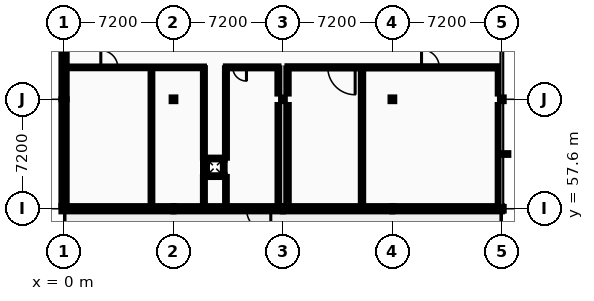
"""IFC4 building model, lengths in metres.
Left out: names, types, materials, properties, quantities, classifications, styles, units other than length and angle.
Written with IfcOpenShell. Run it as: python <this file> out.ifc"""

import sys

from ifc_helpers import new_model, si_unit, direction, frame, frame_2d, origin, origin_2d, place, context, subcontext, project, spatial, rectangle, i_section, extrude, element, fill, save


model = new_model("IFC4")
c1 = context("Model", 3, precision=1e-05, world=origin(), true_north=direction((0.0, 1.0)))
c2 = subcontext(c1, "Body", "Model", "MODEL_VIEW")
j1 = project(units=[si_unit("LENGTHUNIT", "METRE"), si_unit("PLANEANGLEUNIT", "RADIAN")], contexts=[c1])
p1 = place(None, origin())
s1 = spatial("IfcSite", under=j1, at=p1, CompositionType="ELEMENT")
p2 = place(p1, origin())
s2 = spatial("IfcBuilding", under=s1, at=p2, CompositionType="ELEMENT")
p3 = place(p2, frame((0.0, 0.0, 14.0)))
s3 = spatial("IfcBuildingStorey", under=s2, at=p3, CompositionType="ELEMENT", Elevation=14.0)
for number, where, z_axis, x_axis in (
    (1, (0.0, 57.6, 0.0), (0.0, 0.0, 1.0), (1.0, 0.0, 0.0)),
    (2, (0.0, 64.8, 0.0), (0.0, 0.0, 1.0), (1.0, 0.0, 0.0)),
    (3, (7.2, 57.6, 0.0), (0.0, 0.0, 1.0), (1.0, 0.0, 0.0)),
    (4, (7.2, 64.8, 0.0), (0.0, 0.0, 1.0), (1.0, 0.0, 0.0)),
    (5, (14.4, 57.6, 0.0), (0.0, 0.0, 1.0), (1.0, 0.0, 0.0)),
    (6, (14.4, 64.8, 0.0), (0.0, 0.0, 1.0), (1.0, 0.0, 0.0)),
    (7, (21.6, 57.6, 0.0), (0.0, 0.0, 1.0), (1.0, 0.0, 0.0)),
    (8, (21.6, 64.8, 0.0), (0.0, 0.0, 1.0), (1.0, 0.0, 0.0)),
    (9, (28.8, 57.6, 0.0), (0.0, 0.0, 1.0), (1.0, 0.0, 0.0)),
    (10, (28.8, 64.8, 0.0), (0.0, 0.0, 1.0), (1.0, 0.0, 0.0)),
):
    element("IfcColumn", number, at=place(p3, frame(where, z_axis=z_axis, x_axis=x_axis)), inside=s3, PredefinedType="COLUMN", context=c2, shape_type="SweptSolid", body=[
        extrude(i_section(OverallWidth=0.24, OverallDepth=0.24, WebThickness=0.01, FlangeThickness=0.017, FilletRadius=0.021, at=origin_2d()), origin(), (0.0, 0.0, 1.0), 4.4),
    ])
p4 = place(p3, frame((-0.17, 57.6, 0.0), z_axis=(0.0, 0.0, 1.0), x_axis=(1.0, 0.0, 0.0)))
e11 = element("IfcWall", 11, at=p4, inside=s3, PredefinedType="STANDARD", context=c2, shape_type="SweptSolid", body=[
    extrude(rectangle(XDim=7.37, YDim=0.34, at=frame_2d((3.685, 0.0))), origin(), (0.0, 0.0, 1.0), 4.035),
])
p5 = place(p3, frame((7.2, 57.6, 0.0), z_axis=(0.0, 0.0, 1.0), x_axis=(1.0, 0.0, 0.0)))
e12 = element("IfcWall", 12, at=p5, inside=s3, PredefinedType="STANDARD", context=c2, shape_type="SweptSolid", body=[
    extrude(rectangle(XDim=7.2, YDim=0.34, at=frame_2d((3.6, 0.0))), origin(), (0.0, 0.0, 1.0), 4.035),
])
p6 = place(p5, frame((4.8, 0.0, 0.0)))
e13 = element("IfcOpeningElement", 13, at=p6, cuts=e12, PredefinedType="OPENING", context=c2, shape_type="SweptSolid", body=[
    extrude(rectangle(XDim=1.6, YDim=2.2, at=frame_2d((0.8, 1.1))), frame((0.0, 0.18, 0.0), z_axis=(0.0, -1.0, 0.0), x_axis=(1.0, 0.0, 0.0)), (0.0, 0.0, 1.0), 0.36),
])
p7 = place(p3, frame((14.4, 57.6, 0.0), z_axis=(0.0, 0.0, 1.0), x_axis=(1.0, 0.0, 0.0)))
e14 = element("IfcWall", 14, at=p7, inside=s3, PredefinedType="STANDARD", context=c2, shape_type="SweptSolid", body=[
    extrude(rectangle(XDim=7.2, YDim=0.34, at=frame_2d((3.6, 0.0))), origin(), (0.0, 0.0, 1.0), 4.035),
])
p8 = place(p3, frame((21.6, 57.6, 0.0), z_axis=(0.0, 0.0, 1.0), x_axis=(1.0, 0.0, 0.0)))
e15 = element("IfcWall", 15, at=p8, inside=s3, PredefinedType="STANDARD", context=c2, shape_type="SweptSolid", body=[
    extrude(rectangle(XDim=7.2, YDim=0.34, at=frame_2d((3.6, 0.0))), origin(), (0.0, 0.0, 1.0), 4.035),
])
p9 = place(p3, frame((0.0, 64.8, 0.0), z_axis=(0.0, 0.0, 1.0), x_axis=(0.0, -1.0, 0.0)))
e16 = element("IfcWall", 16, at=p9, inside=s3, PredefinedType="STANDARD", context=c2, shape_type="SweptSolid", body=[
    extrude(rectangle(XDim=7.03, YDim=0.34, at=frame_2d((3.515, 0.0))), origin(), (0.0, 0.0, 1.0), 4.11),
])
p10 = place(p9, frame((1.628, 0.0, 0.95)))
e17 = element("IfcOpeningElement", 17, at=p10, cuts=e16, PredefinedType="OPENING", context=c2, shape_type="SweptSolid", body=[
    extrude(rectangle(XDim=0.962, YDim=1.332, at=frame_2d((0.481, 0.666))), frame((0.0, 0.18, 0.0), z_axis=(0.0, -1.0, 0.0), x_axis=(1.0, 0.0, 0.0)), (0.0, 0.0, 1.0), 0.36),
])
p11 = place(p9, frame((4.44, 0.0, 0.95)))
e18 = element("IfcOpeningElement", 18, at=p11, cuts=e16, PredefinedType="OPENING", context=c2, shape_type="SweptSolid", body=[
    extrude(rectangle(XDim=0.962, YDim=1.332, at=frame_2d((0.481, 0.666))), frame((0.0, 0.18, 0.0), z_axis=(0.0, -1.0, 0.0), x_axis=(1.0, 0.0, 0.0)), (0.0, 0.0, 1.0), 0.36),
])
p12 = place(p3, frame((0.0, 72.0, 0.0), z_axis=(0.0, 0.0, 1.0), x_axis=(0.0, -1.0, 0.0)))
e19 = element("IfcWall", 19, at=p12, inside=s3, PredefinedType="STANDARD", context=c2, shape_type="SweptSolid", body=[
    extrude(rectangle(XDim=7.2, YDim=0.34, at=frame_2d((3.6, 0.0))), origin(), (0.0, 0.0, 1.0), 4.11),
])
p13 = place(p3, frame((0.0, 57.8, 4.4), z_axis=(0.0, 0.0, 1.0), x_axis=(0.0, 1.0, 0.0)))
e20 = element("IfcWall", 20, at=p13, inside=s3, PredefinedType="PARAPET", context=c2, shape_type="SweptSolid", body=[
    extrude(rectangle(XDim=24.0, YDim=0.2, at=frame_2d((12.0, 0.0))), origin(), (0.0, 0.0, 1.0), 0.55),
])
for number, where, z_axis, x_axis in (
    (21, (9.29, 59.745, 0.0), (0.0, 0.0, 1.0), (1.0, 0.0, 0.0)),
    (22, (9.29, 60.905, 0.0), (0.0, 0.0, 1.0), (1.0, 0.0, 0.0)),
):
    element("IfcWall", number, at=place(p3, frame(where, z_axis=z_axis, x_axis=x_axis)), inside=s3, PredefinedType="PARTITIONING", context=c2, shape_type="SweptSolid", body=[
        extrude(rectangle(XDim=1.27, YDim=0.11, at=frame_2d((0.635, 0.0))), origin(), (0.0, 0.0, 1.0), 4.18),
    ])
for number, where, z_axis, x_axis in (
    (23, (9.345, 59.8, 0.0), (0.0, 0.0, 1.0), (0.0, 1.0, 0.0)),
    (24, (10.505, 59.8, 0.0), (0.0, 0.0, 1.0), (0.0, 1.0, 0.0)),
):
    element("IfcWall", number, at=place(p3, frame(where, z_axis=z_axis, x_axis=x_axis)), inside=s3, PredefinedType="PARTITIONING", context=c2, shape_type="SweptSolid", body=[
        extrude(rectangle(XDim=1.05, YDim=0.11, at=frame_2d((0.525, 0.0))), origin(), (0.0, 0.0, 1.0), 4.18),
    ])
p14 = place(p3, frame((0.2, 66.9, 0.0), z_axis=(0.0, 0.0, 1.0), x_axis=(1.0, 0.0, 0.0)))
e25 = element("IfcWall", 25, at=p14, inside=s3, PredefinedType="PARTITIONING", context=c2, shape_type="SweptSolid", body=[
    extrude(rectangle(XDim=9.0, YDim=0.11, at=frame_2d((4.5, 0.0))), origin(), (0.0, 0.0, 1.0), 4.18),
])
p15 = place(p14, frame((7.55, 0.0, 0.0)))
e26 = element("IfcOpeningElement", 26, at=p15, cuts=e25, PredefinedType="OPENING", context=c2, shape_type="SweptSolid", body=[
    extrude(rectangle(XDim=1.0, YDim=2.1, at=frame_2d((0.5, 1.05))), frame((0.0, 0.065, 0.0), z_axis=(0.0, -1.0, 0.0), x_axis=(1.0, 0.0, 0.0)), (0.0, 0.0, 1.0), 0.13),
])
p16 = place(p14, frame((2.218, 0.0, 0.0)))
e27 = element("IfcOpeningElement", 27, at=p16, cuts=e25, PredefinedType="OPENING", context=c2, shape_type="SweptSolid", body=[
    extrude(rectangle(XDim=1.114, YDim=2.04, at=frame_2d((0.557, 1.02))), frame((0.0, 0.065, 0.0), z_axis=(0.0, -1.0, 0.0), x_axis=(1.0, 0.0, 0.0)), (0.0, 0.0, 1.0), 0.13),
])
p17 = place(p3, frame((10.65, 66.9, 0.0), z_axis=(0.0, 0.0, 1.0), x_axis=(1.0, 0.0, 0.0)))
e28 = element("IfcWall", 28, at=p17, inside=s3, PredefinedType="PARTITIONING", context=c2, shape_type="SweptSolid", body=[
    extrude(rectangle(XDim=3.45, YDim=0.125, at=frame_2d((1.725, 0.0))), origin(), (0.0, 0.0, 1.0), 4.18),
])
p18 = place(p17, frame((0.45, 0.0, 0.0)))
e29 = element("IfcOpeningElement", 29, at=p18, cuts=e28, PredefinedType="OPENING", context=c2, shape_type="SweptSolid", body=[
    extrude(rectangle(XDim=0.9, YDim=2.1, at=frame_2d((0.45, 1.05))), frame((0.0, 0.073, 0.0), z_axis=(0.0, -1.0, 0.0), x_axis=(1.0, 0.0, 0.0)), (0.0, 0.0, 1.0), 0.145),
])
p19 = place(p3, frame((14.7, 66.9, 0.0), z_axis=(0.0, 0.0, 1.0), x_axis=(1.0, 0.0, 0.0)))
e30 = element("IfcWall", 30, at=p19, inside=s3, PredefinedType="PARTITIONING", context=c2, shape_type="SweptSolid", body=[
    extrude(rectangle(XDim=13.9, YDim=0.142, at=frame_2d((6.95, 0.0))), origin(), (0.0, 0.0, 1.0), 4.18),
])
p20 = place(p19, frame((2.65, 0.0, 0.0)))
e31 = element("IfcOpeningElement", 31, at=p20, cuts=e30, PredefinedType="OPENING", context=c2, shape_type="SweptSolid", body=[
    extrude(rectangle(XDim=1.8, YDim=2.3, at=frame_2d((0.9, 1.15))), frame((0.0, 0.081, 0.0), z_axis=(0.0, -1.0, 0.0), x_axis=(1.0, 0.0, 0.0)), (0.0, 0.0, 1.0), 0.162),
])
p21 = place(p19, frame((8.817, 0.0, 0.0)))
e32 = element("IfcOpeningElement", 32, at=p21, cuts=e30, PredefinedType="OPENING", context=c2, shape_type="SweptSolid", body=[
    extrude(rectangle(XDim=1.166, YDim=2.04, at=frame_2d((0.583, 1.02))), frame((0.0, 0.081, 0.0), z_axis=(0.0, -1.0, 0.0), x_axis=(1.0, 0.0, 0.0)), (0.0, 0.0, 1.0), 0.162),
])
p22 = place(p3, frame((5.75, 57.8, 0.0), z_axis=(0.0, 0.0, 1.0), x_axis=(0.0, 1.0, 0.0)))
e33 = element("IfcWall", 33, at=p22, inside=s3, PredefinedType="PARTITIONING", context=c2, shape_type="SweptSolid", body=[
    extrude(rectangle(XDim=9.045, YDim=0.11, at=frame_2d((4.522, 0.0))), origin(), (0.0, 0.0, 1.0), 4.18),
])
p23 = place(p3, frame((9.2, 57.8, 0.0), z_axis=(0.0, 0.0, 1.0), x_axis=(0.0, 1.0, 0.0)))
e34 = element("IfcWall", 34, at=p23, inside=s3, PredefinedType="PARTITIONING", context=c2, shape_type="SweptSolid", body=[
    extrude(rectangle(XDim=1.89, YDim=0.125, at=frame_2d((0.945, 0.0))), origin(), (0.0, 0.0, 1.0), 4.18),
])
p24 = place(p3, frame((9.2, 59.8, 0.0), z_axis=(0.0, 0.0, 1.0), x_axis=(0.0, 1.0, 0.0)))
e35 = element("IfcWall", 35, at=p24, inside=s3, PredefinedType="PARTITIONING", context=c2, shape_type="SweptSolid", body=[
    extrude(rectangle(XDim=1.05, YDim=0.11, at=frame_2d((0.525, 0.0))), origin(), (0.0, 0.0, 1.0), 4.18),
])
p25 = place(p3, frame((9.2, 60.96, 0.0), z_axis=(0.0, 0.0, 1.0), x_axis=(0.0, 1.0, 0.0)))
e36 = element("IfcWall", 36, at=p25, inside=s3, PredefinedType="PARTITIONING", context=c2, shape_type="SweptSolid", body=[
    extrude(rectangle(XDim=5.885, YDim=0.125, at=frame_2d((2.942, 0.0))), origin(), (0.0, 0.0, 1.0), 4.18),
])
p26 = place(p3, frame((10.65, 57.8, 0.0), z_axis=(0.0, 0.0, 1.0), x_axis=(0.0, 1.0, 0.0)))
e37 = element("IfcWall", 37, at=p26, inside=s3, PredefinedType="PARTITIONING", context=c2, shape_type="SweptSolid", body=[
    extrude(rectangle(XDim=1.89, YDim=0.11, at=frame_2d((0.945, 0.0))), origin(), (0.0, 0.0, 1.0), 4.18),
])
p27 = place(p3, frame((10.65, 60.96, 0.0), z_axis=(0.0, 0.0, 1.0), x_axis=(0.0, 1.0, 0.0)))
e38 = element("IfcWall", 38, at=p27, inside=s3, PredefinedType="PARTITIONING", context=c2, shape_type="SweptSolid", body=[
    extrude(rectangle(XDim=5.877, YDim=0.125, at=frame_2d((2.939, 0.0))), origin(), (0.0, 0.0, 1.0), 4.18),
])
p28 = place(p3, frame((14.1, 57.98, 0.0), z_axis=(0.0, 0.0, 1.0), x_axis=(0.0, 1.0, 0.0)))
e39 = element("IfcWall", 39, at=p28, inside=s3, PredefinedType="PARTITIONING", context=c2, shape_type="SweptSolid", body=[
    extrude(rectangle(XDim=6.44, YDim=0.11, at=frame_2d((3.22, 0.0))), origin(), (0.0, 0.0, 1.0), 4.18),
])
p29 = place(p3, frame((14.1, 65.18, 0.0), z_axis=(0.0, 0.0, 1.0), x_axis=(0.0, 1.0, 0.0)))
e40 = element("IfcWall", 40, at=p29, inside=s3, PredefinedType="PARTITIONING", context=c2, shape_type="SweptSolid", body=[
    extrude(rectangle(XDim=1.657, YDim=0.125, at=frame_2d((0.829, 0.0))), origin(), (0.0, 0.0, 1.0), 4.18),
])
p30 = place(p3, frame((14.7, 57.98, 0.0), z_axis=(0.0, 0.0, 1.0), x_axis=(0.0, 1.0, 0.0)))
e41 = element("IfcWall", 41, at=p30, inside=s3, PredefinedType="PARTITIONING", context=c2, shape_type="SweptSolid", body=[
    extrude(rectangle(XDim=6.44, YDim=0.16, at=frame_2d((3.22, 0.0))), origin(), (0.0, 0.0, 1.0), 4.18),
])
p31 = place(p3, frame((14.7, 65.18, 0.0), z_axis=(0.0, 0.0, 1.0), x_axis=(0.0, 1.0, 0.0)))
e42 = element("IfcWall", 42, at=p31, inside=s3, PredefinedType="PARTITIONING", context=c2, shape_type="SweptSolid", body=[
    extrude(rectangle(XDim=1.649, YDim=0.15, at=frame_2d((0.825, 0.0))), origin(), (0.0, 0.0, 1.0), 4.18),
])
p32 = place(p3, frame((19.6, 57.8, 0.0), z_axis=(0.0, 0.0, 1.0), x_axis=(0.0, 1.0, 0.0)))
e43 = element("IfcWall", 43, at=p32, inside=s3, PredefinedType="PARTITIONING", context=c2, shape_type="SweptSolid", body=[
    extrude(rectangle(XDim=9.029, YDim=0.15, at=frame_2d((4.515, 0.0))), origin(), (0.0, 0.0, 1.0), 4.18),
])
p33 = place(p3, frame((28.6, 57.98, 0.0), z_axis=(0.0, 0.0, 1.0), x_axis=(0.0, 1.0, 0.0)))
e44 = element("IfcWall", 44, at=p33, inside=s3, PredefinedType="PARTITIONING", context=c2, shape_type="SweptSolid", body=[
    extrude(rectangle(XDim=6.44, YDim=0.142, at=frame_2d((3.22, 0.0))), origin(), (0.0, 0.0, 1.0), 4.11),
])
p34 = place(p3, frame((28.6, 65.18, 0.0), z_axis=(0.0, 0.0, 1.0), x_axis=(0.0, 1.0, 0.0)))
e45 = element("IfcWall", 45, at=p34, inside=s3, PredefinedType="PARTITIONING", context=c2, shape_type="SweptSolid", body=[
    extrude(rectangle(XDim=1.649, YDim=0.135, at=frame_2d((0.825, 0.0))), origin(), (0.0, 0.0, 1.0), 4.11),
])
p35 = place(p10, origin())
e46 = element("IfcWindow", 46, at=p35, inside=s3, PartitioningType="SINGLE_PANEL", PredefinedType="WINDOW", context=c2, shape_type="SweptSolid", body=[
    extrude(rectangle(XDim=0.962, YDim=1.332, at=frame_2d((0.481, 0.666))), frame((0.0, 0.03, 0.0), z_axis=(0.0, -1.0, 0.0), x_axis=(1.0, 0.0, 0.0)), (0.0, 0.0, 1.0), 0.06),
])
fill(e17, e46)
p36 = place(p11, origin())
e47 = element("IfcWindow", 47, at=p36, inside=s3, PartitioningType="SINGLE_PANEL", PredefinedType="WINDOW", context=c2, shape_type="SweptSolid", body=[
    extrude(rectangle(XDim=0.962, YDim=1.332, at=frame_2d((0.481, 0.666))), frame((0.0, 0.03, 0.0), z_axis=(0.0, -1.0, 0.0), x_axis=(1.0, 0.0, 0.0)), (0.0, 0.0, 1.0), 0.06),
])
fill(e18, e47)
p37 = place(p6, origin())
e48 = element("IfcDoor", 48, at=p37, inside=s3, OperationType="DOUBLE_DOOR_SINGLE_SWING", PredefinedType="DOOR", context=c2, shape_type="SweptSolid", body=[
    extrude(rectangle(XDim=1.6, YDim=2.2, at=frame_2d((0.8, 1.1))), frame((0.0, 0.025, 0.0), z_axis=(0.0, -1.0, 0.0), x_axis=(1.0, 0.0, 0.0)), (0.0, 0.0, 1.0), 0.05),
])
fill(e13, e48)
p38 = place(p15, origin())
e49 = element("IfcDoor", 49, at=p38, inside=s3, OperationType="SLIDING_TO_LEFT", PredefinedType="DOOR", context=c2, shape_type="SweptSolid", body=[
    extrude(rectangle(XDim=1.0, YDim=2.1, at=frame_2d((0.5, 1.05))), frame((0.0, 0.025, 0.0), z_axis=(0.0, -1.0, 0.0), x_axis=(1.0, 0.0, 0.0)), (0.0, 0.0, 1.0), 0.05),
])
fill(e26, e49)
p39 = place(p18, origin())
e50 = element("IfcDoor", 50, at=p39, inside=s3, OperationType="SINGLE_SWING_RIGHT", PredefinedType="DOOR", context=c2, shape_type="SweptSolid", body=[
    extrude(rectangle(XDim=0.9, YDim=2.1, at=frame_2d((0.45, 1.05))), frame((0.0, 0.025, 0.0), z_axis=(0.0, -1.0, 0.0), x_axis=(1.0, 0.0, 0.0)), (0.0, 0.0, 1.0), 0.05),
])
fill(e29, e50)
p40 = place(p20, origin())
e51 = element("IfcDoor", 51, at=p40, inside=s3, OperationType="DOUBLE_DOOR_SINGLE_SWING", PredefinedType="DOOR", context=c2, shape_type="SweptSolid", body=[
    extrude(rectangle(XDim=1.8, YDim=2.3, at=frame_2d((0.9, 1.15))), frame((0.0, 0.025, 0.0), z_axis=(0.0, -1.0, 0.0), x_axis=(1.0, 0.0, 0.0)), (0.0, 0.0, 1.0), 0.05),
])
fill(e31, e51)
p41 = place(p16, origin())
e52 = element("IfcDoor", 52, at=p41, inside=s3, OperationType="SINGLE_SWING_LEFT", PredefinedType="DOOR", context=c2, shape_type="SweptSolid", body=[
    extrude(rectangle(XDim=1.114, YDim=2.04, at=frame_2d((0.557, 1.02))), frame((0.0, 0.025, 0.0), z_axis=(0.0, -1.0, 0.0), x_axis=(1.0, 0.0, 0.0)), (0.0, 0.0, 1.0), 0.05),
])
fill(e27, e52)
p42 = place(p21, origin())
e53 = element("IfcDoor", 53, at=p42, inside=s3, OperationType="SINGLE_SWING_LEFT", PredefinedType="DOOR", context=c2, shape_type="SweptSolid", body=[
    extrude(rectangle(XDim=1.166, YDim=2.04, at=frame_2d((0.583, 1.02))), frame((0.0, 0.025, 0.0), z_axis=(0.0, -1.0, 0.0), x_axis=(1.0, 0.0, 0.0)), (0.0, 0.0, 1.0), 0.05),
])
fill(e32, e53)
save(model, sys.argv[1])
